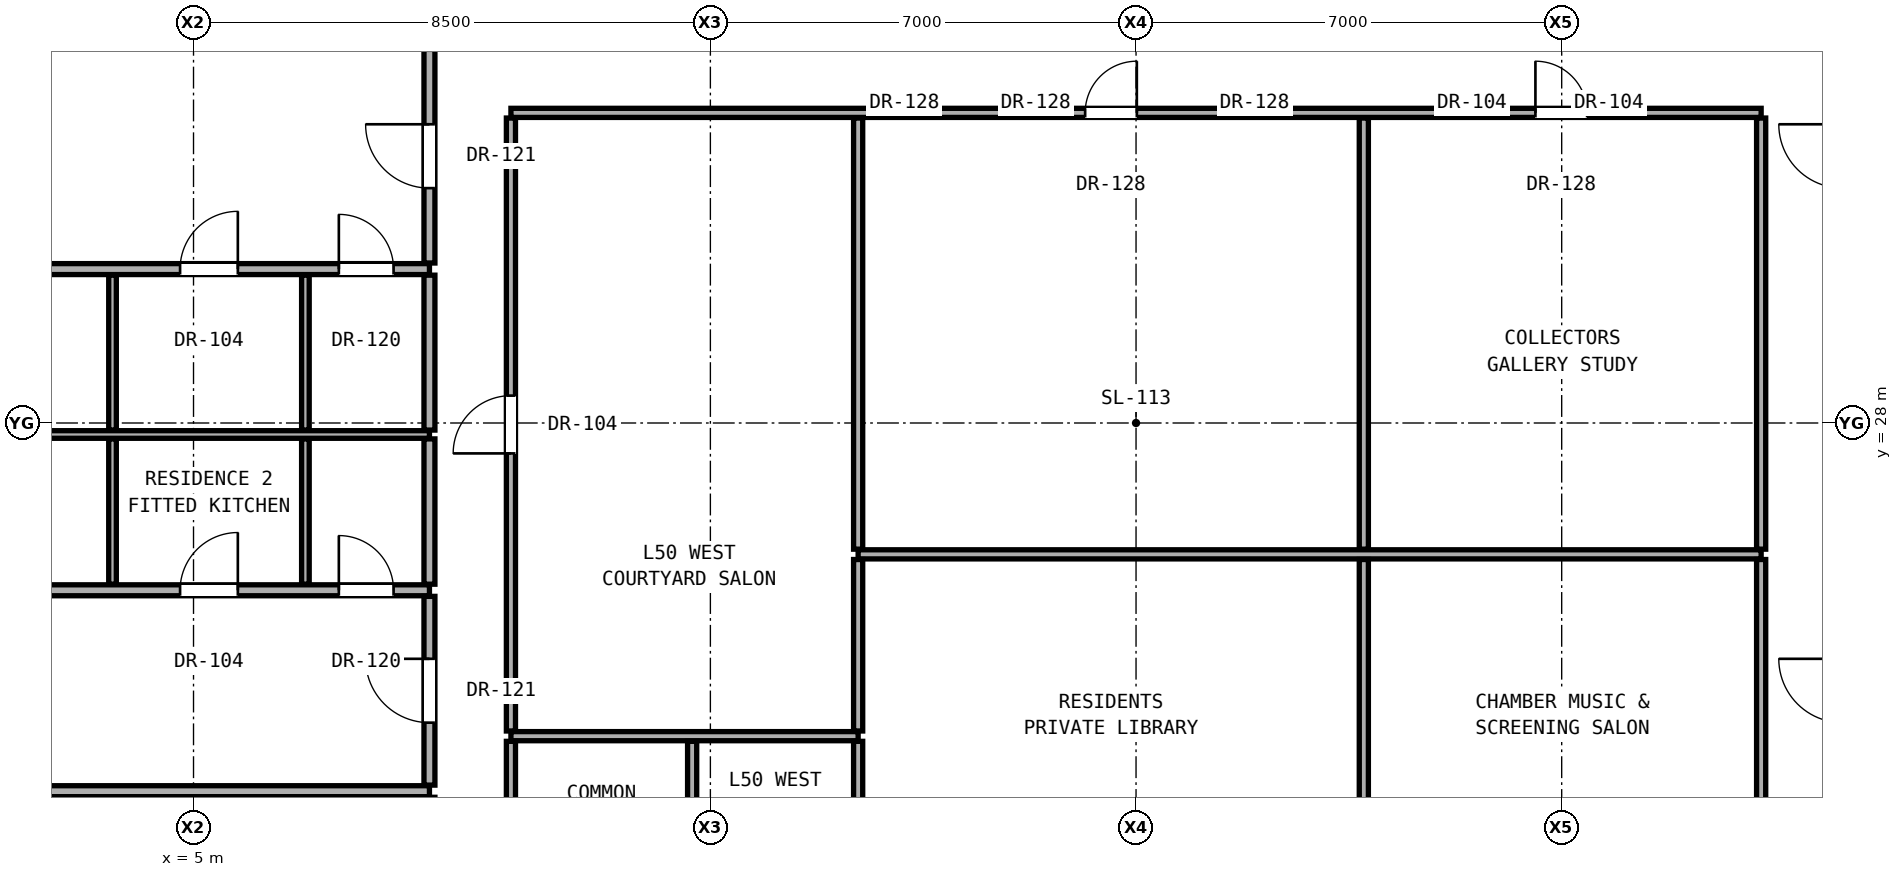
"""IFC4 building model, lengths in metres.
Left out: names, types, materials, properties, quantities, classifications, styles, units other than length and angle.
Written with IfcOpenShell. Run it as: python <this file> out.ifc"""

import sys

from ifc_helpers import new_model, si_unit, direction, frame, frame_2d, origin, place, context, subcontext, project, spatial, rectangle, extrude, element, fill, save


model = new_model("IFC4")
c1 = context("Model", 3, precision=1e-05, world=origin(), true_north=direction((0.0, 1.0)))
c2 = subcontext(c1, "Body", "Model", "MODEL_VIEW")
j1 = project(units=[si_unit("LENGTHUNIT", "METRE"), si_unit("PLANEANGLEUNIT", "RADIAN")], contexts=[c1])
p1 = place(None, origin())
s1 = spatial("IfcSite", under=j1, at=p1, CompositionType="ELEMENT")
p2 = place(p1, origin())
s2 = spatial("IfcBuilding", under=s1, at=p2, CompositionType="ELEMENT")
p3 = place(p2, frame((0.0, 0.0, 177.15)))
s3 = spatial("IfcBuildingStorey", under=s2, at=p3, CompositionType="ELEMENT", Elevation=177.15)
p4 = place(p3, frame((-1.09, 21.945, 0.0), z_axis=(0.0, 0.0, 1.0), x_axis=(1.0, 0.0, 0.0)))
e1 = element("IfcWall", 1, at=p4, inside=s3, PredefinedType="PARTITIONING", context=c2, shape_type="SweptSolid", body=[
    extrude(rectangle(XDim=9.97, YDim=0.18, at=frame_2d((4.985, 0.0))), origin(), (0.0, 0.0, 1.0), 2.269),
])
p5 = place(p3, frame((10.22, 22.85, 0.0), z_axis=(0.0, 0.0, 1.0), x_axis=(1.0, 0.0, 0.0)))
e2 = element("IfcWall", 2, at=p5, inside=s3, PredefinedType="PARTITIONING", context=c2, shape_type="SweptSolid", body=[
    extrude(rectangle(XDim=5.71, YDim=0.15, at=frame_2d((2.855, 0.0))), origin(), (0.0, 0.0, 1.0), 2.186),
])
p6 = place(p3, frame((-1.09, 25.249, 0.0), z_axis=(0.0, 0.0, 1.0), x_axis=(1.0, 0.0, 0.0)))
e3 = element("IfcWall", 3, at=p6, inside=s3, PredefinedType="PARTITIONING", context=c2, shape_type="SweptSolid", body=[
    extrude(rectangle(XDim=9.97, YDim=0.18, at=frame_2d((4.985, 0.0))), origin(), (0.0, 0.0, 1.0), 2.269),
])
p7 = place(p6, frame((1.624, 0.0, 0.0)))
e4 = element("IfcOpeningElement", 4, at=p7, cuts=e3, PredefinedType="OPENING", context=c2, shape_type="SweptSolid", body=[
    extrude(rectangle(XDim=0.95, YDim=2.15, at=frame_2d((0.475, 1.075))), frame((0.0, 0.1, 0.0), z_axis=(0.0, -1.0, 0.0), x_axis=(1.0, 0.0, 0.0)), (0.0, 0.0, 1.0), 0.2),
])
p8 = place(p6, frame((5.869, 0.0, 0.0)))
e5 = element("IfcOpeningElement", 5, at=p8, cuts=e3, PredefinedType="OPENING", context=c2, shape_type="SweptSolid", body=[
    extrude(rectangle(XDim=0.95, YDim=2.15, at=frame_2d((0.475, 1.075))), frame((0.0, 0.1, 0.0), z_axis=(0.0, -1.0, 0.0), x_axis=(1.0, 0.0, 0.0)), (0.0, 0.0, 1.0), 0.2),
])
p9 = place(p6, frame((8.48, 0.0, 0.0)))
e6 = element("IfcOpeningElement", 6, at=p9, cuts=e3, PredefinedType="OPENING", context=c2, shape_type="SweptSolid", body=[
    extrude(rectangle(XDim=0.9, YDim=2.1, at=frame_2d((0.45, 1.05))), frame((0.0, 0.1, 0.0), z_axis=(0.0, -1.0, 0.0), x_axis=(1.0, 0.0, 0.0)), (0.0, 0.0, 1.0), 0.2),
])
p10 = place(p3, frame((15.93, 25.84, 0.0), z_axis=(0.0, 0.0, 1.0), x_axis=(1.0, 0.0, 0.0)))
e7 = element("IfcWall", 7, at=p10, inside=s3, PredefinedType="PARTITIONING", context=c2, shape_type="SweptSolid", body=[
    extrude(rectangle(XDim=14.85, YDim=0.15, at=frame_2d((7.425, 0.0))), origin(), (0.0, 0.0, 1.0), 2.186),
])
p11 = place(p3, frame((-1.09, 27.811, 0.0), z_axis=(0.0, 0.0, 1.0), x_axis=(1.0, 0.0, 0.0)))
e8 = element("IfcWall", 8, at=p11, inside=s3, PredefinedType="PARTITIONING", context=c2, shape_type="SweptSolid", body=[
    extrude(rectangle(XDim=9.97, YDim=0.125, at=frame_2d((4.985, 0.0))), origin(), (0.0, 0.0, 1.0), 2.269),
])
p12 = place(p3, frame((-1.09, 30.531, 0.0), z_axis=(0.0, 0.0, 1.0), x_axis=(1.0, 0.0, 0.0)))
e9 = element("IfcWall", 9, at=p12, inside=s3, PredefinedType="PARTITIONING", context=c2, shape_type="SweptSolid", body=[
    extrude(rectangle(XDim=9.97, YDim=0.18, at=frame_2d((4.985, 0.0))), origin(), (0.0, 0.0, 1.0), 2.269),
])
p13 = place(p12, frame((1.624, 0.0, 0.0)))
e10 = element("IfcOpeningElement", 10, at=p13, cuts=e9, PredefinedType="OPENING", context=c2, shape_type="SweptSolid", body=[
    extrude(rectangle(XDim=0.95, YDim=2.15, at=frame_2d((0.475, 1.075))), frame((0.0, 0.1, 0.0), z_axis=(0.0, -1.0, 0.0), x_axis=(1.0, 0.0, 0.0)), (0.0, 0.0, 1.0), 0.2),
])
p14 = place(p12, frame((5.869, 0.0, 0.0)))
e11 = element("IfcOpeningElement", 11, at=p14, cuts=e9, PredefinedType="OPENING", context=c2, shape_type="SweptSolid", body=[
    extrude(rectangle(XDim=0.95, YDim=2.15, at=frame_2d((0.475, 1.075))), frame((0.0, 0.1, 0.0), z_axis=(0.0, -1.0, 0.0), x_axis=(1.0, 0.0, 0.0)), (0.0, 0.0, 1.0), 0.2),
])
p15 = place(p12, frame((8.48, 0.0, 0.0)))
e12 = element("IfcOpeningElement", 12, at=p15, cuts=e9, PredefinedType="OPENING", context=c2, shape_type="SweptSolid", body=[
    extrude(rectangle(XDim=0.9, YDim=2.1, at=frame_2d((0.45, 1.05))), frame((0.0, 0.1, 0.0), z_axis=(0.0, -1.0, 0.0), x_axis=(1.0, 0.0, 0.0)), (0.0, 0.0, 1.0), 0.2),
])
p16 = place(p3, frame((10.22, 33.1, 0.0), z_axis=(0.0, 0.0, 1.0), x_axis=(1.0, 0.0, 0.0)))
e13 = element("IfcWall", 13, at=p16, inside=s3, PredefinedType="PARTITIONING", context=c2, shape_type="SweptSolid", body=[
    extrude(rectangle(XDim=20.56, YDim=0.15, at=frame_2d((10.28, 0.0))), origin(), (0.0, 0.0, 1.0), 2.186),
])
p17 = place(p16, frame((9.443, 0.0, 0.0)))
e14 = element("IfcOpeningElement", 14, at=p17, cuts=e13, PredefinedType="OPENING", context=c2, shape_type="SweptSolid", body=[
    extrude(rectangle(XDim=0.85, YDim=2.01, at=frame_2d((0.425, 1.005))), frame((0.0, 0.085, 0.0), z_axis=(0.0, -1.0, 0.0), x_axis=(1.0, 0.0, 0.0)), (0.0, 0.0, 1.0), 0.17),
])
p18 = place(p16, frame((16.848, 0.0, 0.0)))
e15 = element("IfcOpeningElement", 15, at=p18, cuts=e13, PredefinedType="OPENING", context=c2, shape_type="SweptSolid", body=[
    extrude(rectangle(XDim=0.85, YDim=2.01, at=frame_2d((0.425, 1.005))), frame((0.0, 0.085, 0.0), z_axis=(0.0, -1.0, 0.0), x_axis=(1.0, 0.0, 0.0)), (0.0, 0.0, 1.0), 0.17),
])
p19 = place(p3, frame((3.668, 25.349, 0.0), z_axis=(0.0, 0.0, 1.0), x_axis=(0.0, 1.0, 0.0)))
e16 = element("IfcWall", 16, at=p19, inside=s3, PredefinedType="PARTITIONING", context=c2, shape_type="SweptSolid", body=[
    extrude(rectangle(XDim=2.389, YDim=0.125, at=frame_2d((1.195, 0.0))), origin(), (0.0, 0.0, 1.0), 3.05),
])
p20 = place(p3, frame((3.668, 27.884, 0.0), z_axis=(0.0, 0.0, 1.0), x_axis=(0.0, 1.0, 0.0)))
e17 = element("IfcWall", 17, at=p20, inside=s3, PredefinedType="PARTITIONING", context=c2, shape_type="SweptSolid", body=[
    extrude(rectangle(XDim=2.547, YDim=0.125, at=frame_2d((1.274, 0.0))), origin(), (0.0, 0.0, 1.0), 3.05),
])
p21 = place(p3, frame((6.84, 25.349, 0.0), z_axis=(0.0, 0.0, 1.0), x_axis=(0.0, 1.0, 0.0)))
e18 = element("IfcWall", 18, at=p21, inside=s3, PredefinedType="PARTITIONING", context=c2, shape_type="SweptSolid", body=[
    extrude(rectangle(XDim=2.389, YDim=0.125, at=frame_2d((1.195, 0.0))), origin(), (0.0, 0.0, 1.0), 3.05),
])
p22 = place(p3, frame((6.84, 27.884, 0.0), z_axis=(0.0, 0.0, 1.0), x_axis=(0.0, 1.0, 0.0)))
e19 = element("IfcWall", 19, at=p22, inside=s3, PredefinedType="PARTITIONING", context=c2, shape_type="SweptSolid", body=[
    extrude(rectangle(XDim=2.547, YDim=0.125, at=frame_2d((1.274, 0.0))), origin(), (0.0, 0.0, 1.0), 3.05),
])
p23 = place(p3, frame((8.88, 22.045, 0.0), z_axis=(0.0, 0.0, 1.0), x_axis=(0.0, 1.0, 0.0)))
e20 = element("IfcWall", 20, at=p23, inside=s3, PredefinedType="PARTITIONING", context=c2, shape_type="SweptSolid", body=[
    extrude(rectangle(XDim=3.104, YDim=0.18, at=frame_2d((1.552, 0.0))), origin(), (0.0, 0.0, 1.0), 2.346),
])
p24 = place(p23, frame((1.027, 0.0, 0.0)))
e21 = element("IfcOpeningElement", 21, at=p24, cuts=e20, PredefinedType="OPENING", context=c2, shape_type="SweptSolid", body=[
    extrude(rectangle(XDim=1.05, YDim=2.2, at=frame_2d((0.525, 1.1))), frame((0.0, 0.1, 0.0), z_axis=(0.0, -1.0, 0.0), x_axis=(1.0, 0.0, 0.0)), (0.0, 0.0, 1.0), 0.2),
])
p25 = place(p3, frame((8.88, 25.349, 0.0), z_axis=(0.0, 0.0, 1.0), x_axis=(0.0, 1.0, 0.0)))
e22 = element("IfcWall", 22, at=p25, inside=s3, PredefinedType="PARTITIONING", context=c2, shape_type="SweptSolid", body=[
    extrude(rectangle(XDim=2.389, YDim=0.18, at=frame_2d((1.195, 0.0))), origin(), (0.0, 0.0, 1.0), 3.05),
])
p26 = place(p3, frame((8.88, 27.884, 0.0), z_axis=(0.0, 0.0, 1.0), x_axis=(0.0, 1.0, 0.0)))
e23 = element("IfcWall", 23, at=p26, inside=s3, PredefinedType="PARTITIONING", context=c2, shape_type="SweptSolid", body=[
    extrude(rectangle(XDim=2.547, YDim=0.18, at=frame_2d((1.274, 0.0))), origin(), (0.0, 0.0, 1.0), 3.05),
])
p27 = place(p3, frame((8.88, 30.631, 0.0), z_axis=(0.0, 0.0, 1.0), x_axis=(0.0, 1.0, 0.0)))
e24 = element("IfcWall", 24, at=p27, inside=s3, PredefinedType="PARTITIONING", context=c2, shape_type="SweptSolid", body=[
    extrude(rectangle(XDim=3.513, YDim=0.18, at=frame_2d((1.756, 0.0))), origin(), (0.0, 0.0, 1.0), 2.346),
])
p28 = place(p27, frame((1.231, 0.0, 0.0)))
e25 = element("IfcOpeningElement", 25, at=p28, cuts=e24, PredefinedType="OPENING", context=c2, shape_type="SweptSolid", body=[
    extrude(rectangle(XDim=1.05, YDim=2.2, at=frame_2d((0.525, 1.1))), frame((0.0, 0.1, 0.0), z_axis=(0.0, -1.0, 0.0), x_axis=(1.0, 0.0, 0.0)), (0.0, 0.0, 1.0), 0.2),
])
p29 = place(p3, frame((10.22, 19.985, 0.0), z_axis=(0.0, 0.0, 1.0), x_axis=(0.0, 1.0, 0.0)))
e26 = element("IfcWall", 26, at=p29, inside=s3, PredefinedType="PARTITIONING", context=c2, shape_type="SweptSolid", body=[
    extrude(rectangle(XDim=2.78, YDim=0.15, at=frame_2d((1.39, 0.0))), origin(), (0.0, 0.0, 1.0), 3.05),
])
p30 = place(p3, frame((10.22, 22.935, 0.0), z_axis=(0.0, 0.0, 1.0), x_axis=(0.0, 1.0, 0.0)))
e27 = element("IfcWall", 27, at=p30, inside=s3, PredefinedType="PARTITIONING", context=c2, shape_type="SweptSolid", body=[
    extrude(rectangle(XDim=10.08, YDim=0.15, at=frame_2d((5.04, 0.0))), origin(), (0.0, 0.0, 1.0), 2.346),
])
p31 = place(p30, frame((4.565, 0.0, 0.0)))
e28 = element("IfcOpeningElement", 28, at=p31, cuts=e27, PredefinedType="OPENING", context=c2, shape_type="SweptSolid", body=[
    extrude(rectangle(XDim=0.95, YDim=2.15, at=frame_2d((0.475, 1.075))), frame((0.0, 0.085, 0.0), z_axis=(0.0, -1.0, 0.0), x_axis=(1.0, 0.0, 0.0)), (0.0, 0.0, 1.0), 0.17),
])
for number, where, z_axis, x_axis in (
    (29, (13.2, 19.985, 0.0), (0.0, 0.0, 1.0), (0.0, 1.0, 0.0)),
    (30, (15.93, 19.985, 0.0), (0.0, 0.0, 1.0), (0.0, 1.0, 0.0)),
):
    element("IfcWall", number, at=place(p3, frame(where, z_axis=z_axis, x_axis=x_axis)), inside=s3, PredefinedType="PARTITIONING", context=c2, shape_type="SweptSolid", body=[
        extrude(rectangle(XDim=2.78, YDim=0.15, at=frame_2d((1.39, 0.0))), origin(), (0.0, 0.0, 1.0), 3.05),
    ])
p32 = place(p3, frame((15.93, 22.935, 0.0), z_axis=(0.0, 0.0, 1.0), x_axis=(0.0, 1.0, 0.0)))
e31 = element("IfcWall", 31, at=p32, inside=s3, PredefinedType="PARTITIONING", context=c2, shape_type="SweptSolid", body=[
    extrude(rectangle(XDim=2.82, YDim=0.15, at=frame_2d((1.41, 0.0))), origin(), (0.0, 0.0, 1.0), 2.186),
])
p33 = place(p3, frame((15.93, 25.925, 0.0), z_axis=(0.0, 0.0, 1.0), x_axis=(0.0, 1.0, 0.0)))
e32 = element("IfcWall", 32, at=p33, inside=s3, PredefinedType="PARTITIONING", context=c2, shape_type="SweptSolid", body=[
    extrude(rectangle(XDim=7.09, YDim=0.15, at=frame_2d((3.545, 0.0))), origin(), (0.0, 0.0, 1.0), 2.186),
])
p34 = place(p3, frame((24.246, 19.985, 0.0), z_axis=(0.0, 0.0, 1.0), x_axis=(0.0, 1.0, 0.0)))
e33 = element("IfcWall", 33, at=p34, inside=s3, PredefinedType="PARTITIONING", context=c2, shape_type="SweptSolid", body=[
    extrude(rectangle(XDim=5.77, YDim=0.15, at=frame_2d((2.885, 0.0))), origin(), (0.0, 0.0, 1.0), 2.186),
])
p35 = place(p3, frame((24.246, 25.925, 0.0), z_axis=(0.0, 0.0, 1.0), x_axis=(0.0, 1.0, 0.0)))
e34 = element("IfcWall", 34, at=p35, inside=s3, PredefinedType="PARTITIONING", context=c2, shape_type="SweptSolid", body=[
    extrude(rectangle(XDim=7.09, YDim=0.15, at=frame_2d((3.545, 0.0))), origin(), (0.0, 0.0, 1.0), 2.186),
])
p36 = place(p3, frame((30.78, 19.985, 0.0), z_axis=(0.0, 0.0, 1.0), x_axis=(0.0, 1.0, 0.0)))
e35 = element("IfcWall", 35, at=p36, inside=s3, PredefinedType="PARTITIONING", context=c2, shape_type="SweptSolid", body=[
    extrude(rectangle(XDim=5.77, YDim=0.15, at=frame_2d((2.885, 0.0))), origin(), (0.0, 0.0, 1.0), 2.346),
])
p37 = place(p3, frame((30.78, 25.925, 0.0), z_axis=(0.0, 0.0, 1.0), x_axis=(0.0, 1.0, 0.0)))
e36 = element("IfcWall", 36, at=p37, inside=s3, PredefinedType="PARTITIONING", context=c2, shape_type="SweptSolid", body=[
    extrude(rectangle(XDim=7.09, YDim=0.15, at=frame_2d((3.545, 0.0))), origin(), (0.0, 0.0, 1.0), 2.346),
])
p38 = place(p24, origin())
e37 = element("IfcDoor", 37, at=p38, inside=s3, OperationType="SINGLE_SWING_RIGHT", PredefinedType="DOOR", context=c2, shape_type="SweptSolid", body=[
    extrude(rectangle(XDim=1.05, YDim=2.2, at=frame_2d((0.525, 1.1))), frame((0.0, 0.025, 0.0), z_axis=(0.0, -1.0, 0.0), x_axis=(1.0, 0.0, 0.0)), (0.0, 0.0, 1.0), 0.05),
])
fill(e21, e37)
p39 = place(p8, origin())
e38 = element("IfcDoor", 38, at=p39, inside=s3, OperationType="SINGLE_SWING_RIGHT", PredefinedType="DOOR", context=c2, shape_type="SweptSolid", body=[
    extrude(rectangle(XDim=0.95, YDim=2.15, at=frame_2d((0.475, 1.075))), frame((0.0, 0.025, 0.0), z_axis=(0.0, -1.0, 0.0), x_axis=(1.0, 0.0, 0.0)), (0.0, 0.0, 1.0), 0.05),
])
fill(e5, e38)
p40 = place(p9, origin())
e39 = element("IfcDoor", 39, at=p40, inside=s3, OperationType="SINGLE_SWING_LEFT", PredefinedType="DOOR", context=c2, shape_type="SweptSolid", body=[
    extrude(rectangle(XDim=0.9, YDim=2.1, at=frame_2d((0.45, 1.05))), frame((0.0, 0.025, 0.0), z_axis=(0.0, -1.0, 0.0), x_axis=(1.0, 0.0, 0.0)), (0.0, 0.0, 1.0), 0.05),
])
fill(e6, e39)
p41 = place(p28, origin())
e40 = element("IfcDoor", 40, at=p41, inside=s3, OperationType="SINGLE_SWING_RIGHT", PredefinedType="DOOR", context=c2, shape_type="SweptSolid", body=[
    extrude(rectangle(XDim=1.05, YDim=2.2, at=frame_2d((0.525, 1.1))), frame((0.0, 0.025, 0.0), z_axis=(0.0, -1.0, 0.0), x_axis=(1.0, 0.0, 0.0)), (0.0, 0.0, 1.0), 0.05),
])
fill(e25, e40)
p42 = place(p14, origin())
e41 = element("IfcDoor", 41, at=p42, inside=s3, OperationType="SINGLE_SWING_RIGHT", PredefinedType="DOOR", context=c2, shape_type="SweptSolid", body=[
    extrude(rectangle(XDim=0.95, YDim=2.15, at=frame_2d((0.475, 1.075))), frame((0.0, 0.025, 0.0), z_axis=(0.0, -1.0, 0.0), x_axis=(1.0, 0.0, 0.0)), (0.0, 0.0, 1.0), 0.05),
])
fill(e11, e41)
p43 = place(p15, origin())
e42 = element("IfcDoor", 42, at=p43, inside=s3, OperationType="SINGLE_SWING_LEFT", PredefinedType="DOOR", context=c2, shape_type="SweptSolid", body=[
    extrude(rectangle(XDim=0.9, YDim=2.1, at=frame_2d((0.45, 1.05))), frame((0.0, 0.025, 0.0), z_axis=(0.0, -1.0, 0.0), x_axis=(1.0, 0.0, 0.0)), (0.0, 0.0, 1.0), 0.05),
])
fill(e12, e42)
p44 = place(p31, origin())
e43 = element("IfcDoor", 43, at=p44, inside=s3, OperationType="SINGLE_SWING_LEFT", PredefinedType="DOOR", context=c2, shape_type="SweptSolid", body=[
    extrude(rectangle(XDim=0.95, YDim=2.15, at=frame_2d((0.475, 1.075))), frame((0.0, 0.025, 0.0), z_axis=(0.0, -1.0, 0.0), x_axis=(1.0, 0.0, 0.0)), (0.0, 0.0, 1.0), 0.05),
])
fill(e28, e43)
p45 = place(p17, origin())
e44 = element("IfcDoor", 44, at=p45, inside=s3, OperationType="SINGLE_SWING_RIGHT", PredefinedType="DOOR", context=c2, shape_type="SweptSolid", body=[
    extrude(rectangle(XDim=0.85, YDim=2.01, at=frame_2d((0.425, 1.005))), frame((0.0, 0.025, 0.0), z_axis=(0.0, -1.0, 0.0), x_axis=(1.0, 0.0, 0.0)), (0.0, 0.0, 1.0), 0.05),
])
fill(e14, e44)
p46 = place(p18, origin())
e45 = element("IfcDoor", 45, at=p46, inside=s3, OperationType="SINGLE_SWING_LEFT", PredefinedType="DOOR", context=c2, shape_type="SweptSolid", body=[
    extrude(rectangle(XDim=0.85, YDim=2.01, at=frame_2d((0.425, 1.005))), frame((0.0, 0.025, 0.0), z_axis=(0.0, -1.0, 0.0), x_axis=(1.0, 0.0, 0.0)), (0.0, 0.0, 1.0), 0.05),
])
fill(e15, e45)
save(model, sys.argv[1])
